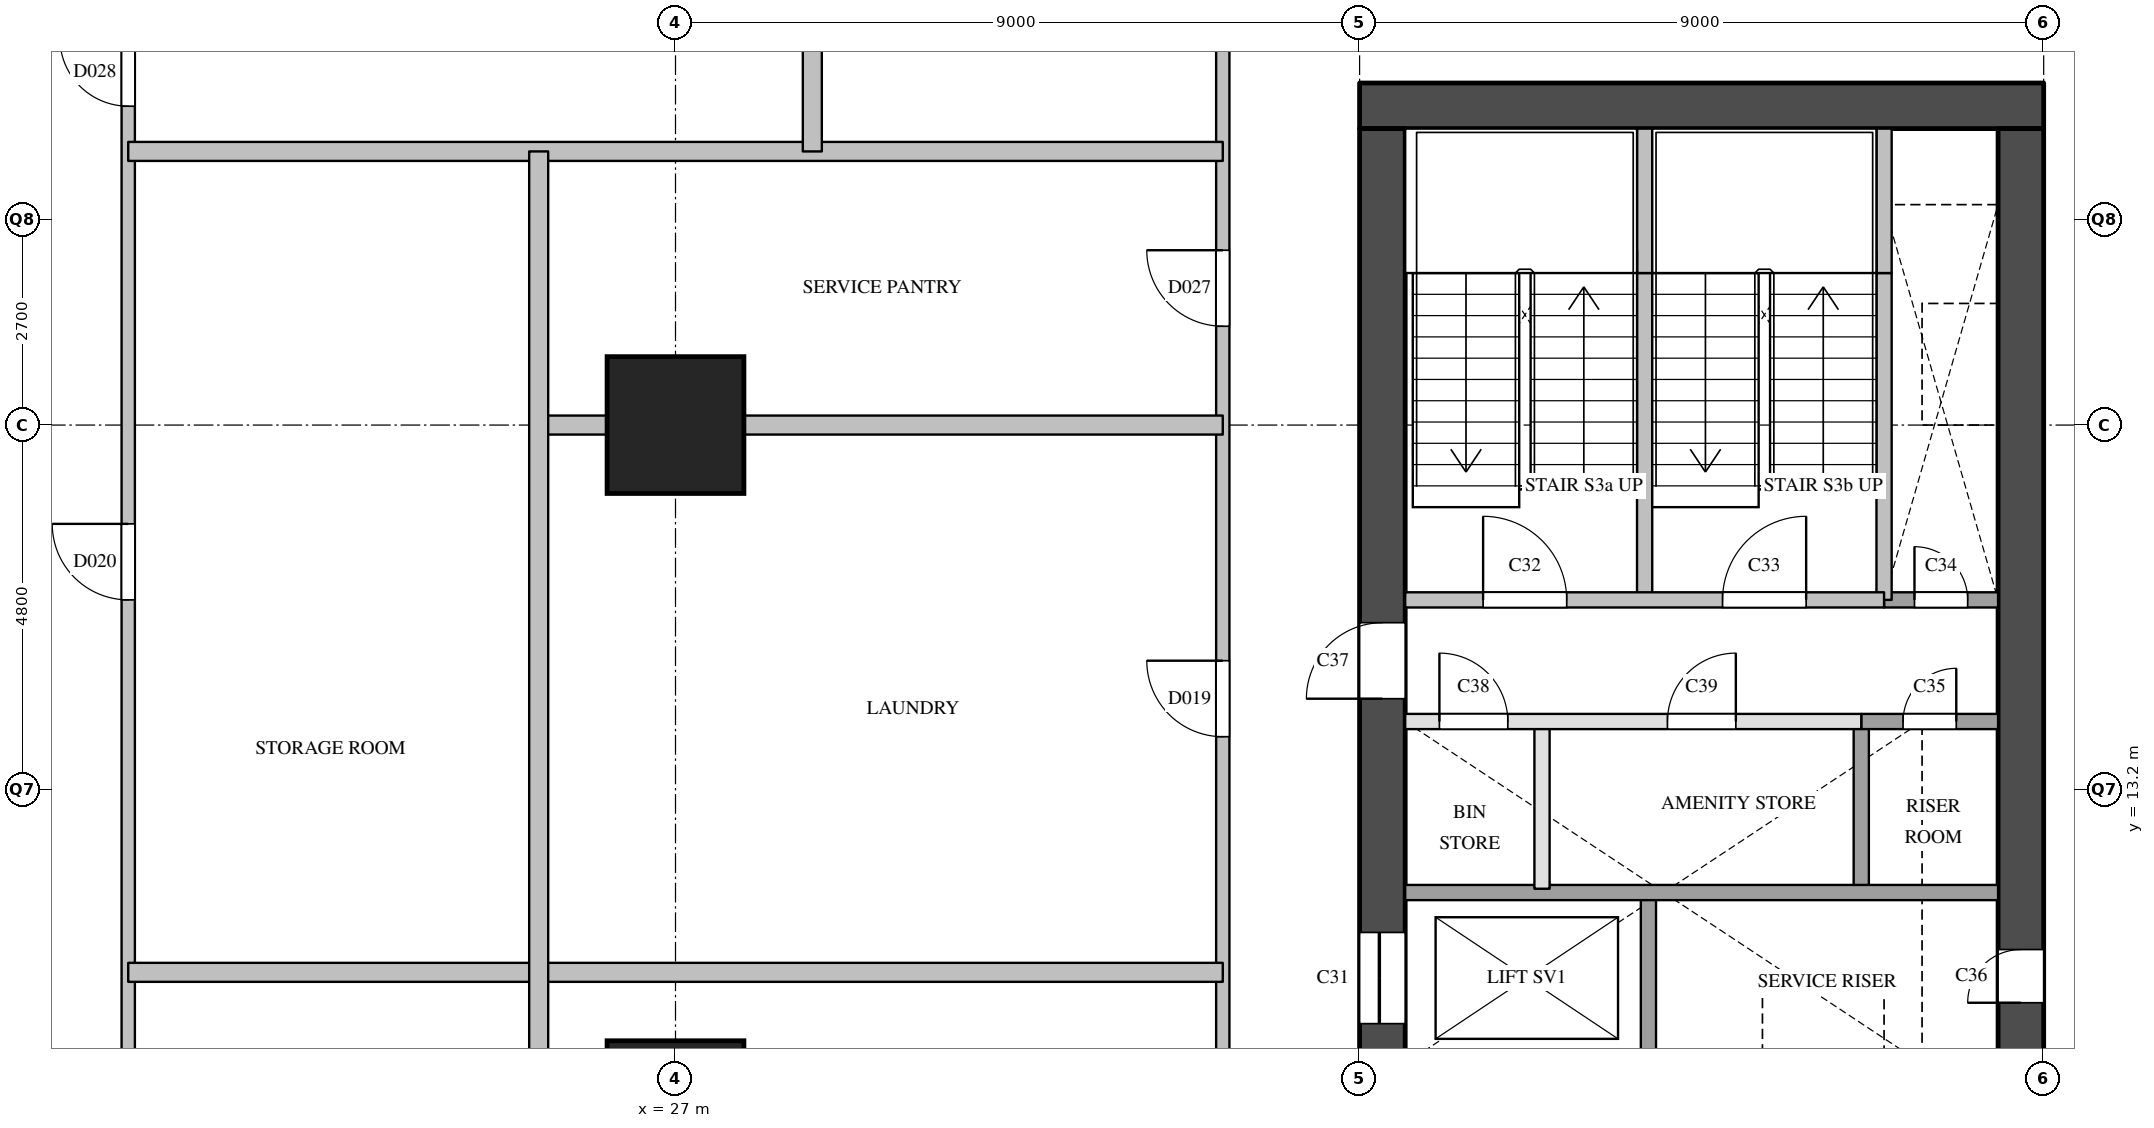
"""IFC4 building model, lengths in metres.
Left out: names, types, materials, properties, quantities, classifications, styles, units other than length and angle.
Written with IfcOpenShell. Run it as: python <this file> out.ifc"""

import sys

from ifc_helpers import new_model, si_unit, direction, frame, frame_2d, origin, origin_2d, place, context, subcontext, project, spatial, rectangle, extrude, element, fill, save


model = new_model("IFC4")
c1 = context("Model", 3, precision=1e-05, world=origin(), true_north=direction((0.0, 1.0)))
c2 = subcontext(c1, "Body", "Model", "MODEL_VIEW")
j1 = project(units=[si_unit("LENGTHUNIT", "METRE"), si_unit("PLANEANGLEUNIT", "RADIAN")], contexts=[c1])
p1 = place(None, origin())
s1 = spatial("IfcSite", under=j1, at=p1, CompositionType="ELEMENT")
p2 = place(p1, origin())
s2 = spatial("IfcBuilding", under=s1, at=p2, CompositionType="ELEMENT")
p3 = place(p2, frame((0.0, 0.0, 57.6)))
s3 = spatial("IfcBuildingStorey", under=s2, at=p3, CompositionType="ELEMENT", Elevation=57.6)
for number, where, z_axis, x_axis in (
    (1, (27.0, 9.0, 0.0), (0.0, 0.0, 1.0), (1.0, 0.0, 0.0)),
    (2, (27.0, 18.0, 0.0), (0.0, 0.0, 1.0), (1.0, 0.0, 0.0)),
):
    element("IfcColumn", number, at=place(p3, frame(where, z_axis=z_axis, x_axis=x_axis)), inside=s3, PredefinedType="COLUMN", context=c2, shape_type="SweptSolid", body=[
        extrude(rectangle(XDim=1.8, YDim=1.8, at=origin_2d()), origin(), (0.0, 0.0, 1.0), 3.8),
    ])
p4 = place(p3, frame((36.0, 22.2, 0.0), z_axis=(0.0, 0.0, 1.0), x_axis=(1.0, 0.0, 0.0)))
e3 = element("IfcWall", 3, at=p4, inside=s3, PredefinedType="SHEAR", context=c2, shape_type="SweptSolid", body=[
    extrude(rectangle(XDim=9.0, YDim=0.6, at=frame_2d((4.5, 0.0))), origin(), (0.0, 0.0, 1.0), 3.5),
])
p5 = place(p3, frame((36.3, 9.6, 0.0), z_axis=(0.0, 0.0, 1.0), x_axis=(0.0, 1.0, 0.0)))
e4 = element("IfcWall", 4, at=p5, inside=s3, PredefinedType="SHEAR", context=c2, shape_type="SweptSolid", body=[
    extrude(rectangle(XDim=12.3, YDim=0.6, at=frame_2d((6.15, 0.0))), origin(), (0.0, 0.0, 1.0), 3.5),
])
p6 = place(p5, frame((0.525, 0.0, 0.0)))
e5 = element("IfcOpeningElement", 5, at=p6, cuts=e4, PredefinedType="OPENING", context=c2, shape_type="SweptSolid", body=[
    extrude(rectangle(XDim=1.2, YDim=2.1, at=frame_2d((0.6, 1.05))), frame((0.0, 0.31, 0.0), z_axis=(0.0, -1.0, 0.0), x_axis=(1.0, 0.0, 0.0)), (0.0, 0.0, 1.0), 0.62),
])
p7 = place(p5, frame((4.8, 0.0, 0.0)))
e6 = element("IfcOpeningElement", 6, at=p7, cuts=e4, PredefinedType="OPENING", context=c2, shape_type="SweptSolid", body=[
    extrude(rectangle(XDim=1.0, YDim=2.1, at=frame_2d((0.5, 1.05))), frame((0.0, 0.31, 0.0), z_axis=(0.0, -1.0, 0.0), x_axis=(1.0, 0.0, 0.0)), (0.0, 0.0, 1.0), 0.62),
])
p8 = place(p3, frame((44.7, 9.6, 0.0), z_axis=(0.0, 0.0, 1.0), x_axis=(0.0, 1.0, 0.0)))
e7 = element("IfcWall", 7, at=p8, inside=s3, PredefinedType="SHEAR", context=c2, shape_type="SweptSolid", body=[
    extrude(rectangle(XDim=12.3, YDim=0.6, at=frame_2d((6.15, 0.0))), origin(), (0.0, 0.0, 1.0), 3.5),
])
p9 = place(p8, frame((0.8, 0.0, 0.0)))
e8 = element("IfcOpeningElement", 8, at=p9, cuts=e7, PredefinedType="OPENING", context=c2, shape_type="SweptSolid", body=[
    extrude(rectangle(XDim=0.7, YDim=2.1, at=frame_2d((0.35, 1.05))), frame((0.0, 0.31, 0.0), z_axis=(0.0, -1.0, 0.0), x_axis=(1.0, 0.0, 0.0)), (0.0, 0.0, 1.0), 0.62),
])
p10 = place(p3, frame((38.4, 11.9, 0.0), z_axis=(0.0, 0.0, 1.0), x_axis=(0.0, 1.0, 0.0)))
e9 = element("IfcWall", 9, at=p10, inside=s3, PredefinedType="PARTITIONING", context=c2, shape_type="SweptSolid", body=[
    extrude(rectangle(XDim=2.2, YDim=0.2, at=frame_2d((1.1, 0.0))), origin(), (0.0, 0.0, 1.0), 3.5),
])
p11 = place(p3, frame((39.75, 15.7, 0.0), z_axis=(0.0, 0.0, 1.0), x_axis=(0.0, 1.0, 0.0)))
e10 = element("IfcWall", 10, at=p11, inside=s3, PredefinedType="SOLIDWALL", context=c2, shape_type="SweptSolid", body=[
    extrude(rectangle(XDim=4.3, YDim=0.2, at=frame_2d((2.15, 0.0))), origin(), (0.0, 0.0, 1.0), 3.5),
])
p12 = place(p3, frame((39.75, 20.0, 0.0), z_axis=(0.0, 0.0, 1.0), x_axis=(0.0, 1.0, 0.0)))
e11 = element("IfcWall", 11, at=p12, inside=s3, PredefinedType="SOLIDWALL", context=c2, shape_type="SweptSolid", body=[
    extrude(rectangle(XDim=1.9, YDim=0.2, at=frame_2d((0.95, 0.0))), origin(), (0.0, 0.0, 1.0), 3.5),
])
p13 = place(p3, frame((39.8, 9.6, 0.0), z_axis=(0.0, 0.0, 1.0), x_axis=(0.0, 1.0, 0.0)))
e12 = element("IfcWall", 12, at=p13, inside=s3, PredefinedType="SOLIDWALL", context=c2, shape_type="SweptSolid", body=[
    extrude(rectangle(XDim=2.3, YDim=0.2, at=frame_2d((1.15, 0.0))), origin(), (0.0, 0.0, 1.0), 3.5),
])
p14 = place(p3, frame((42.6, 11.9, 0.0), z_axis=(0.0, 0.0, 1.0), x_axis=(0.0, 1.0, 0.0)))
e13 = element("IfcWall", 13, at=p14, inside=s3, PredefinedType="SOLIDWALL", context=c2, shape_type="SweptSolid", body=[
    extrude(rectangle(XDim=2.2, YDim=0.2, at=frame_2d((1.1, 0.0))), origin(), (0.0, 0.0, 1.0), 3.5),
])
p15 = place(p3, frame((42.9, 15.7, 0.0), z_axis=(0.0, 0.0, 1.0), x_axis=(0.0, 1.0, 0.0)))
e14 = element("IfcWall", 14, at=p15, inside=s3, PredefinedType="SOLIDWALL", context=c2, shape_type="SweptSolid", body=[
    extrude(rectangle(XDim=4.3, YDim=0.2, at=frame_2d((2.15, 0.0))), origin(), (0.0, 0.0, 1.0), 3.5),
])
p16 = place(p3, frame((42.9, 20.0, 0.0), z_axis=(0.0, 0.0, 1.0), x_axis=(0.0, 1.0, 0.0)))
e15 = element("IfcWall", 15, at=p16, inside=s3, PredefinedType="SOLIDWALL", context=c2, shape_type="SweptSolid", body=[
    extrude(rectangle(XDim=1.9, YDim=0.2, at=frame_2d((0.95, 0.0))), origin(), (0.0, 0.0, 1.0), 3.5),
])
p17 = place(p3, frame((36.6, 11.85, 0.0), z_axis=(0.0, 0.0, 1.0), x_axis=(1.0, 0.0, 0.0)))
e16 = element("IfcWall", 16, at=p17, inside=s3, PredefinedType="SOLIDWALL", context=c2, shape_type="SweptSolid", body=[
    extrude(rectangle(XDim=7.8, YDim=0.2, at=frame_2d((3.9, 0.0))), origin(), (0.0, 0.0, 1.0), 3.5),
])
p18 = place(p3, frame((36.6, 14.1, 0.0), z_axis=(0.0, 0.0, 1.0), x_axis=(1.0, 0.0, 0.0)))
e17 = element("IfcWall", 17, at=p18, inside=s3, PredefinedType="PARTITIONING", context=c2, shape_type="SweptSolid", body=[
    extrude(rectangle(XDim=6.0, YDim=0.2, at=frame_2d((3.0, 0.0))), origin(), (0.0, 0.0, 1.0), 3.5),
])
p19 = place(p18, frame((0.45, 0.0, 0.0)))
e18 = element("IfcOpeningElement", 18, at=p19, cuts=e17, PredefinedType="OPENING", context=c2, shape_type="SweptSolid", body=[
    extrude(rectangle(XDim=0.9, YDim=2.1, at=frame_2d((0.45, 1.05))), frame((0.0, 0.11, 0.0), z_axis=(0.0, -1.0, 0.0), x_axis=(1.0, 0.0, 0.0)), (0.0, 0.0, 1.0), 0.22),
])
p20 = place(p18, frame((3.45, 0.0, 0.0)))
e19 = element("IfcOpeningElement", 19, at=p20, cuts=e17, PredefinedType="OPENING", context=c2, shape_type="SweptSolid", body=[
    extrude(rectangle(XDim=0.9, YDim=2.1, at=frame_2d((0.45, 1.05))), frame((0.0, 0.11, 0.0), z_axis=(0.0, -1.0, 0.0), x_axis=(1.0, 0.0, 0.0)), (0.0, 0.0, 1.0), 0.22),
])
p21 = place(p3, frame((42.6, 14.1, 0.0), z_axis=(0.0, 0.0, 1.0), x_axis=(1.0, 0.0, 0.0)))
e20 = element("IfcWall", 20, at=p21, inside=s3, PredefinedType="SOLIDWALL", context=c2, shape_type="SweptSolid", body=[
    extrude(rectangle(XDim=1.8, YDim=0.2, at=frame_2d((0.9, 0.0))), origin(), (0.0, 0.0, 1.0), 3.5),
])
p22 = place(p21, frame((0.55, 0.0, 0.0)))
e21 = element("IfcOpeningElement", 21, at=p22, cuts=e20, PredefinedType="OPENING", context=c2, shape_type="SweptSolid", body=[
    extrude(rectangle(XDim=0.7, YDim=2.1, at=frame_2d((0.35, 1.05))), frame((0.0, 0.11, 0.0), z_axis=(0.0, -1.0, 0.0), x_axis=(1.0, 0.0, 0.0)), (0.0, 0.0, 1.0), 0.22),
])
p23 = place(p3, frame((42.9, 15.7, 0.0), z_axis=(0.0, 0.0, 1.0), x_axis=(1.0, 0.0, 0.0)))
e22 = element("IfcWall", 22, at=p23, inside=s3, PredefinedType="SOLIDWALL", context=c2, shape_type="SweptSolid", body=[
    extrude(rectangle(XDim=1.5, YDim=0.2, at=frame_2d((0.75, 0.0))), origin(), (0.0, 0.0, 1.0), 3.5),
])
p24 = place(p23, frame((0.4, 0.0, 0.0)))
e23 = element("IfcOpeningElement", 23, at=p24, cuts=e22, PredefinedType="OPENING", context=c2, shape_type="SweptSolid", body=[
    extrude(rectangle(XDim=0.7, YDim=2.1, at=frame_2d((0.35, 1.05))), frame((0.0, 0.11, 0.0), z_axis=(0.0, -1.0, 0.0), x_axis=(1.0, 0.0, 0.0)), (0.0, 0.0, 1.0), 0.22),
])
p25 = place(p3, frame((36.6, 15.7, 0.0), z_axis=(0.0, 0.0, 1.0), x_axis=(1.0, 0.0, 0.0)))
e24 = element("IfcWall", 24, at=p25, inside=s3, PredefinedType="SOLIDWALL", context=c2, shape_type="SweptSolid", body=[
    extrude(rectangle(XDim=6.3, YDim=0.2, at=frame_2d((3.15, 0.0))), origin(), (0.0, 0.0, 1.0), 3.5),
])
p26 = place(p25, frame((1.025, 0.0, 0.0)))
e25 = element("IfcOpeningElement", 25, at=p26, cuts=e24, PredefinedType="OPENING", context=c2, shape_type="SweptSolid", body=[
    extrude(rectangle(XDim=1.1, YDim=2.1, at=frame_2d((0.55, 1.05))), frame((0.0, 0.11, 0.0), z_axis=(0.0, -1.0, 0.0), x_axis=(1.0, 0.0, 0.0)), (0.0, 0.0, 1.0), 0.22),
])
p27 = place(p25, frame((4.175, 0.0, 0.0)))
e26 = element("IfcOpeningElement", 26, at=p27, cuts=e24, PredefinedType="OPENING", context=c2, shape_type="SweptSolid", body=[
    extrude(rectangle(XDim=1.1, YDim=2.1, at=frame_2d((0.55, 1.05))), frame((0.0, 0.11, 0.0), z_axis=(0.0, -1.0, 0.0), x_axis=(1.0, 0.0, 0.0)), (0.0, 0.0, 1.0), 0.22),
])
p28 = place(p3, frame((19.8, 7.2, 0.0), z_axis=(0.0, 0.0, 1.0), x_axis=(0.0, 1.0, 0.0)))
e27 = element("IfcWall", 27, at=p28, inside=s3, PredefinedType="PARTITIONING", context=c2, shape_type="SweptSolid", body=[
    extrude(rectangle(XDim=16.49, YDim=0.175, at=frame_2d((8.245, 0.0))), origin(), (0.0, 0.0, 1.0), 3.5),
])
p29 = place(p28, frame((1.35, 0.0, 0.0)))
e28 = element("IfcOpeningElement", 28, at=p29, cuts=e27, PredefinedType="OPENING", context=c2, shape_type="SweptSolid", body=[
    extrude(rectangle(XDim=0.9, YDim=2.1, at=frame_2d((0.45, 1.05))), frame((0.0, 0.097, 0.0), z_axis=(0.0, -1.0, 0.0), x_axis=(1.0, 0.0, 0.0)), (0.0, 0.0, 1.0), 0.195),
])
p30 = place(p28, frame((8.5, 0.0, 0.0)))
e29 = element("IfcOpeningElement", 29, at=p30, cuts=e27, PredefinedType="OPENING", context=c2, shape_type="SweptSolid", body=[
    extrude(rectangle(XDim=1.0, YDim=2.1, at=frame_2d((0.5, 1.05))), frame((0.0, 0.097, 0.0), z_axis=(0.0, -1.0, 0.0), x_axis=(1.0, 0.0, 0.0)), (0.0, 0.0, 1.0), 0.195),
])
p31 = place(p28, frame((14.995, 0.0, 0.0)))
e30 = element("IfcOpeningElement", 30, at=p31, cuts=e27, PredefinedType="OPENING", context=c2, shape_type="SweptSolid", body=[
    extrude(rectangle(XDim=0.9, YDim=2.1, at=frame_2d((0.45, 1.05))), frame((0.0, 0.097, 0.0), z_axis=(0.0, -1.0, 0.0), x_axis=(1.0, 0.0, 0.0)), (0.0, 0.0, 1.0), 0.195),
])
p32 = place(p3, frame((34.2, 7.2, 0.0), z_axis=(0.0, 0.0, 1.0), x_axis=(0.0, 1.0, 0.0)))
e31 = element("IfcWall", 31, at=p32, inside=s3, PredefinedType="PARTITIONING", context=c2, shape_type="SweptSolid", body=[
    extrude(rectangle(XDim=16.49, YDim=0.175, at=frame_2d((8.245, 0.0))), origin(), (0.0, 0.0, 1.0), 3.5),
])
p33 = place(p32, frame((1.3, 0.0, 0.0)))
e32 = element("IfcOpeningElement", 32, at=p33, cuts=e31, PredefinedType="OPENING", context=c2, shape_type="SweptSolid", body=[
    extrude(rectangle(XDim=1.0, YDim=2.1, at=frame_2d((0.5, 1.05))), frame((0.0, 0.097, 0.0), z_axis=(0.0, -1.0, 0.0), x_axis=(1.0, 0.0, 0.0)), (0.0, 0.0, 1.0), 0.195),
])
p34 = place(p32, frame((6.7, 0.0, 0.0)))
e33 = element("IfcOpeningElement", 33, at=p34, cuts=e31, PredefinedType="OPENING", context=c2, shape_type="SweptSolid", body=[
    extrude(rectangle(XDim=1.0, YDim=2.1, at=frame_2d((0.5, 1.05))), frame((0.0, 0.097, 0.0), z_axis=(0.0, -1.0, 0.0), x_axis=(1.0, 0.0, 0.0)), (0.0, 0.0, 1.0), 0.195),
])
p35 = place(p32, frame((12.1, 0.0, 0.0)))
e34 = element("IfcOpeningElement", 34, at=p35, cuts=e31, PredefinedType="OPENING", context=c2, shape_type="SweptSolid", body=[
    extrude(rectangle(XDim=1.0, YDim=2.1, at=frame_2d((0.5, 1.05))), frame((0.0, 0.097, 0.0), z_axis=(0.0, -1.0, 0.0), x_axis=(1.0, 0.0, 0.0)), (0.0, 0.0, 1.0), 0.195),
])
p36 = place(p3, frame((19.8, 10.8, 0.0), z_axis=(0.0, 0.0, 1.0), x_axis=(1.0, 0.0, 0.0)))
e35 = element("IfcWall", 35, at=p36, inside=s3, PredefinedType="PARTITIONING", context=c2, shape_type="SweptSolid", body=[
    extrude(rectangle(XDim=14.4, YDim=0.25, at=frame_2d((7.2, 0.0))), origin(), (0.0, 0.0, 1.0), 2.5),
])
p37 = place(p3, frame((25.2, 18.0, 0.0), z_axis=(0.0, 0.0, 1.0), x_axis=(1.0, 0.0, 0.0)))
e36 = element("IfcWall", 36, at=p37, inside=s3, PredefinedType="PARTITIONING", context=c2, shape_type="SweptSolid", body=[
    extrude(rectangle(XDim=9.0, YDim=0.25, at=frame_2d((4.5, 0.0))), origin(), (0.0, 0.0, 1.0), 3.5),
])
p38 = place(p3, frame((19.8, 21.6, 0.0), z_axis=(0.0, 0.0, 1.0), x_axis=(1.0, 0.0, 0.0)))
e37 = element("IfcWall", 37, at=p38, inside=s3, PredefinedType="PARTITIONING", context=c2, shape_type="SweptSolid", body=[
    extrude(rectangle(XDim=14.4, YDim=0.25, at=frame_2d((7.2, 0.0))), origin(), (0.0, 0.0, 1.0), 2.5),
])
p39 = place(p3, frame((25.2, 0.0, 0.0), z_axis=(0.0, 0.0, 1.0), x_axis=(0.0, 1.0, 0.0)))
e38 = element("IfcWall", 38, at=p39, inside=s3, PredefinedType="PARTITIONING", context=c2, shape_type="SweptSolid", body=[
    extrude(rectangle(XDim=21.6, YDim=0.25, at=frame_2d((10.8, 0.0))), origin(), (0.0, 0.0, 1.0), 2.5),
])
p40 = place(p3, frame((28.8, 21.6, 0.0), z_axis=(0.0, 0.0, 1.0), x_axis=(0.0, 1.0, 0.0)))
e39 = element("IfcWall", 39, at=p40, inside=s3, PredefinedType="PARTITIONING", context=c2, shape_type="SweptSolid", body=[
    extrude(rectangle(XDim=32.4, YDim=0.25, at=frame_2d((16.2, 0.0))), origin(), (0.0, 0.0, 1.0), 2.5),
])
p41 = place(p6, origin())
e40 = element("IfcDoor", 40, at=p41, inside=s3, OperationType="SLIDING_TO_LEFT", PredefinedType="DOOR", context=c2, shape_type="SweptSolid", body=[
    extrude(rectangle(XDim=1.2, YDim=2.1, at=frame_2d((0.6, 1.05))), frame((0.0, 0.025, 0.0), z_axis=(0.0, -1.0, 0.0), x_axis=(1.0, 0.0, 0.0)), (0.0, 0.0, 1.0), 0.05),
])
fill(e5, e40)
p42 = place(p26, origin())
e41 = element("IfcDoor", 41, at=p42, inside=s3, OperationType="SINGLE_SWING_LEFT", PredefinedType="DOOR", context=c2, shape_type="SweptSolid", body=[
    extrude(rectangle(XDim=1.1, YDim=2.1, at=frame_2d((0.55, 1.05))), frame((0.0, 0.025, 0.0), z_axis=(0.0, -1.0, 0.0), x_axis=(1.0, 0.0, 0.0)), (0.0, 0.0, 1.0), 0.05),
])
fill(e25, e41)
p43 = place(p27, origin())
e42 = element("IfcDoor", 42, at=p43, inside=s3, OperationType="SINGLE_SWING_RIGHT", PredefinedType="DOOR", context=c2, shape_type="SweptSolid", body=[
    extrude(rectangle(XDim=1.1, YDim=2.1, at=frame_2d((0.55, 1.05))), frame((0.0, 0.025, 0.0), z_axis=(0.0, -1.0, 0.0), x_axis=(1.0, 0.0, 0.0)), (0.0, 0.0, 1.0), 0.05),
])
fill(e26, e42)
p44 = place(p24, origin())
e43 = element("IfcDoor", 43, at=p44, inside=s3, OperationType="SINGLE_SWING_LEFT", PredefinedType="DOOR", context=c2, shape_type="SweptSolid", body=[
    extrude(rectangle(XDim=0.7, YDim=2.1, at=frame_2d((0.35, 1.05))), frame((0.0, 0.025, 0.0), z_axis=(0.0, -1.0, 0.0), x_axis=(1.0, 0.0, 0.0)), (0.0, 0.0, 1.0), 0.05),
])
fill(e23, e43)
p45 = place(p22, origin())
e44 = element("IfcDoor", 44, at=p45, inside=s3, OperationType="SINGLE_SWING_RIGHT", PredefinedType="DOOR", context=c2, shape_type="SweptSolid", body=[
    extrude(rectangle(XDim=0.7, YDim=2.1, at=frame_2d((0.35, 1.05))), frame((0.0, 0.025, 0.0), z_axis=(0.0, -1.0, 0.0), x_axis=(1.0, 0.0, 0.0)), (0.0, 0.0, 1.0), 0.05),
])
fill(e21, e44)
p46 = place(p9, origin())
e45 = element("IfcDoor", 45, at=p46, inside=s3, OperationType="SINGLE_SWING_LEFT", PredefinedType="DOOR", context=c2, shape_type="SweptSolid", body=[
    extrude(rectangle(XDim=0.7, YDim=2.1, at=frame_2d((0.35, 1.05))), frame((0.0, 0.025, 0.0), z_axis=(0.0, -1.0, 0.0), x_axis=(1.0, 0.0, 0.0)), (0.0, 0.0, 1.0), 0.05),
])
fill(e8, e45)
p47 = place(p7, origin())
e46 = element("IfcDoor", 46, at=p47, inside=s3, OperationType="SINGLE_SWING_LEFT", PredefinedType="DOOR", context=c2, shape_type="SweptSolid", body=[
    extrude(rectangle(XDim=1.0, YDim=2.1, at=frame_2d((0.5, 1.05))), frame((0.0, 0.025, 0.0), z_axis=(0.0, -1.0, 0.0), x_axis=(1.0, 0.0, 0.0)), (0.0, 0.0, 1.0), 0.05),
])
fill(e6, e46)
p48 = place(p19, origin())
e47 = element("IfcDoor", 47, at=p48, inside=s3, OperationType="SINGLE_SWING_LEFT", PredefinedType="DOOR", context=c2, shape_type="SweptSolid", body=[
    extrude(rectangle(XDim=0.9, YDim=2.1, at=frame_2d((0.45, 1.05))), frame((0.0, 0.025, 0.0), z_axis=(0.0, -1.0, 0.0), x_axis=(1.0, 0.0, 0.0)), (0.0, 0.0, 1.0), 0.05),
])
fill(e18, e47)
p49 = place(p20, origin())
e48 = element("IfcDoor", 48, at=p49, inside=s3, OperationType="SINGLE_SWING_RIGHT", PredefinedType="DOOR", context=c2, shape_type="SweptSolid", body=[
    extrude(rectangle(XDim=0.9, YDim=2.1, at=frame_2d((0.45, 1.05))), frame((0.0, 0.025, 0.0), z_axis=(0.0, -1.0, 0.0), x_axis=(1.0, 0.0, 0.0)), (0.0, 0.0, 1.0), 0.05),
])
fill(e19, e48)
p50 = place(p34, origin())
e49 = element("IfcDoor", 49, at=p50, inside=s3, OperationType="SINGLE_SWING_RIGHT", PredefinedType="DOOR", context=c2, shape_type="SweptSolid", body=[
    extrude(rectangle(XDim=1.0, YDim=2.1, at=frame_2d((0.5, 1.05))), frame((0.0, 0.025, 0.0), z_axis=(0.0, -1.0, 0.0), x_axis=(1.0, 0.0, 0.0)), (0.0, 0.0, 1.0), 0.05),
])
fill(e33, e49)
p51 = place(p30, origin())
e50 = element("IfcDoor", 50, at=p51, inside=s3, OperationType="SINGLE_SWING_RIGHT", PredefinedType="DOOR", context=c2, shape_type="SweptSolid", body=[
    extrude(rectangle(XDim=1.0, YDim=2.1, at=frame_2d((0.5, 1.05))), frame((0.0, 0.025, 0.0), z_axis=(0.0, -1.0, 0.0), x_axis=(1.0, 0.0, 0.0)), (0.0, 0.0, 1.0), 0.05),
])
fill(e29, e50)
p52 = place(p35, origin())
e51 = element("IfcDoor", 51, at=p52, inside=s3, OperationType="SINGLE_SWING_RIGHT", PredefinedType="DOOR", context=c2, shape_type="SweptSolid", body=[
    extrude(rectangle(XDim=1.0, YDim=2.1, at=frame_2d((0.5, 1.05))), frame((0.0, 0.025, 0.0), z_axis=(0.0, -1.0, 0.0), x_axis=(1.0, 0.0, 0.0)), (0.0, 0.0, 1.0), 0.05),
])
fill(e34, e51)
p53 = place(p31, origin())
e52 = element("IfcDoor", 52, at=p53, inside=s3, OperationType="SINGLE_SWING_RIGHT", PredefinedType="DOOR", context=c2, shape_type="SweptSolid", body=[
    extrude(rectangle(XDim=0.9, YDim=2.1, at=frame_2d((0.45, 1.05))), frame((0.0, 0.025, 0.0), z_axis=(0.0, -1.0, 0.0), x_axis=(1.0, 0.0, 0.0)), (0.0, 0.0, 1.0), 0.05),
])
fill(e30, e52)
save(model, sys.argv[1])
